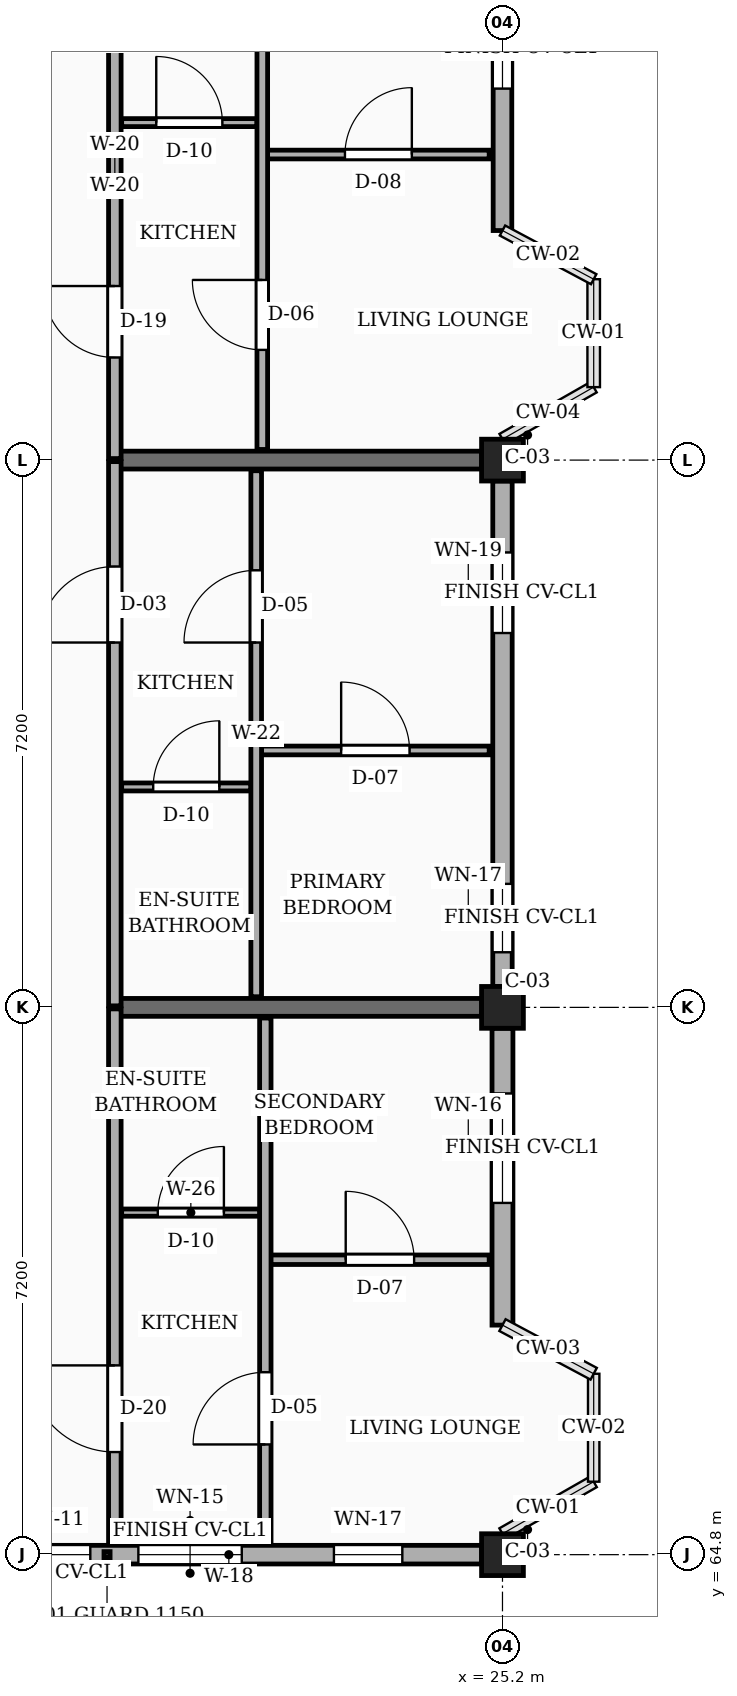
"""IFC4 building model, lengths in metres.
Left out: names, types, materials, properties, quantities, classifications, styles, units other than length and angle.
Written with IfcOpenShell. Run it as: python <this file> out.ifc"""

import sys

from ifc_helpers import new_model, si_unit, direction, frame, frame_2d, origin, origin_2d, place, context, subcontext, project, spatial, rectangle, extrude, element, fill, save


model = new_model("IFC4")
c1 = context("Model", 3, precision=1e-05, world=origin(), true_north=direction((0.0, 1.0)))
c2 = subcontext(c1, "Body", "Model", "MODEL_VIEW")
j1 = project(units=[si_unit("LENGTHUNIT", "METRE"), si_unit("PLANEANGLEUNIT", "RADIAN")], contexts=[c1])
p1 = place(None, origin())
s1 = spatial("IfcSite", under=j1, at=p1, CompositionType="ELEMENT")
p2 = place(p1, origin())
s2 = spatial("IfcBuilding", under=s1, at=p2, CompositionType="ELEMENT")
p3 = place(p2, frame((0.0, 0.0, 13.95)))
s3 = spatial("IfcBuildingStorey", under=s2, at=p3, CompositionType="ELEMENT", Elevation=13.95)
for number, where, z_axis, x_axis in (
    (1, (25.2, 64.8, 0.0), (0.0, 0.0, 1.0), (1.0, 0.0, 0.0)),
    (2, (25.2, 72.0, 0.0), (0.0, 0.0, 1.0), (1.0, 0.0, 0.0)),
    (3, (25.2, 79.2, 0.0), (0.0, 0.0, 1.0), (1.0, 0.0, 0.0)),
):
    element("IfcColumn", number, at=place(p3, frame(where, z_axis=z_axis, x_axis=x_axis)), inside=s3, PredefinedType="COLUMN", context=c2, shape_type="SweptSolid", body=[
        extrude(rectangle(XDim=0.55, YDim=0.55, at=origin_2d()), origin(), (0.0, 0.0, 1.0), 3.15),
    ])
for number, where, z_axis, x_axis in (
    (4, (20.1, 72.0, 0.0), (0.0, 0.0, 1.0), (1.0, 0.0, 0.0)),
    (5, (20.1, 79.2, 0.0), (0.0, 0.0, 1.0), (1.0, 0.0, 0.0)),
):
    element("IfcWall", number, at=place(p3, frame(where, z_axis=z_axis, x_axis=x_axis)), inside=s3, PredefinedType="SOLIDWALL", context=c2, shape_type="SweptSolid", body=[
        extrude(rectangle(XDim=4.825, YDim=0.235, at=frame_2d((2.413, 0.0))), origin(), (0.0, 0.0, 1.0), 2.21),
    ])
p4 = place(p3, frame((18.275, 64.8, 0.0), z_axis=(0.0, 0.0, 1.0), x_axis=(1.0, 0.0, 0.0)))
e6 = element("IfcWall", 6, at=p4, inside=s3, PredefinedType="SOLIDWALL", context=c2, shape_type="SweptSolid", body=[
    extrude(rectangle(XDim=6.65, YDim=0.245, at=frame_2d((3.325, 0.0))), origin(), (0.0, 0.0, 1.0), 2.48),
])
p5 = place(p4, frame((0.462, 0.0, 0.78)))
e7 = element("IfcOpeningElement", 7, at=p5, cuts=e6, PredefinedType="OPENING", context=c2, shape_type="SweptSolid", body=[
    extrude(rectangle(XDim=1.04, YDim=1.26, at=frame_2d((0.52, 0.63))), frame((0.0, 0.133, 0.0), z_axis=(0.0, -1.0, 0.0), x_axis=(1.0, 0.0, 0.0)), (0.0, 0.0, 1.0), 0.265),
])
p6 = place(p4, frame((2.135, 0.0, 0.78)))
e8 = element("IfcOpeningElement", 8, at=p6, cuts=e6, PredefinedType="OPENING", context=c2, shape_type="SweptSolid", body=[
    extrude(rectangle(XDim=1.36, YDim=1.26, at=frame_2d((0.68, 0.63))), frame((0.0, 0.133, 0.0), z_axis=(0.0, -1.0, 0.0), x_axis=(1.0, 0.0, 0.0)), (0.0, 0.0, 1.0), 0.265),
])
p7 = place(p4, frame((4.708, 0.0, 0.78)))
e9 = element("IfcOpeningElement", 9, at=p7, cuts=e6, PredefinedType="OPENING", context=c2, shape_type="SweptSolid", body=[
    extrude(rectangle(XDim=0.9, YDim=1.36, at=frame_2d((0.45, 0.68))), frame((0.0, 0.133, 0.0), z_axis=(0.0, -1.0, 0.0), x_axis=(1.0, 0.0, 0.0)), (0.0, 0.0, 1.0), 0.265),
])
p8 = place(p3, frame((25.2, 67.82, 0.0), z_axis=(0.0, 0.0, 1.0), x_axis=(0.0, 1.0, 0.0)))
e10 = element("IfcWall", 10, at=p8, inside=s3, PredefinedType="SOLIDWALL", context=c2, shape_type="SweptSolid", body=[
    extrude(rectangle(XDim=3.905, YDim=0.275, at=frame_2d((1.953, 0.0))), origin(), (0.0, 0.0, 1.0), 2.48),
])
p9 = place(p8, frame((1.607, 0.0, 0.78)))
e11 = element("IfcOpeningElement", 11, at=p9, cuts=e10, PredefinedType="OPENING", context=c2, shape_type="SweptSolid", body=[
    extrude(rectangle(XDim=1.44, YDim=1.26, at=frame_2d((0.72, 0.63))), frame((0.0, 0.147, 0.0), z_axis=(0.0, -1.0, 0.0), x_axis=(1.0, 0.0, 0.0)), (0.0, 0.0, 1.0), 0.295),
])
p10 = place(p3, frame((25.2, 72.275, 0.0), z_axis=(0.0, 0.0, 1.0), x_axis=(0.0, 1.0, 0.0)))
e12 = element("IfcWall", 12, at=p10, inside=s3, PredefinedType="SOLIDWALL", context=c2, shape_type="SweptSolid", body=[
    extrude(rectangle(XDim=6.65, YDim=0.255, at=frame_2d((3.325, 0.0))), origin(), (0.0, 0.0, 1.0), 2.48),
])
p11 = place(p10, frame((0.45, 0.0, 0.78)))
e13 = element("IfcOpeningElement", 13, at=p11, cuts=e12, PredefinedType="OPENING", context=c2, shape_type="SweptSolid", body=[
    extrude(rectangle(XDim=0.9, YDim=1.36, at=frame_2d((0.45, 0.68))), frame((0.0, 0.137, 0.0), z_axis=(0.0, -1.0, 0.0), x_axis=(1.0, 0.0, 0.0)), (0.0, 0.0, 1.0), 0.275),
])
p12 = place(p10, frame((4.65, 0.0, 0.78)))
e14 = element("IfcOpeningElement", 14, at=p12, cuts=e12, PredefinedType="OPENING", context=c2, shape_type="SweptSolid", body=[
    extrude(rectangle(XDim=1.06, YDim=1.36, at=frame_2d((0.53, 0.68))), frame((0.0, 0.137, 0.0), z_axis=(0.0, -1.0, 0.0), x_axis=(1.0, 0.0, 0.0)), (0.0, 0.0, 1.0), 0.275),
])
p13 = place(p3, frame((25.2, 82.22, 0.0), z_axis=(0.0, 0.0, 1.0), x_axis=(0.0, 1.0, 0.0)))
e15 = element("IfcWall", 15, at=p13, inside=s3, PredefinedType="SOLIDWALL", context=c2, shape_type="SweptSolid", body=[
    extrude(rectangle(XDim=3.905, YDim=0.245, at=frame_2d((1.953, 0.0))), origin(), (0.0, 0.0, 1.0), 2.48),
])
p14 = place(p13, frame((1.867, 0.0, 0.78)))
e16 = element("IfcOpeningElement", 16, at=p14, cuts=e15, PredefinedType="OPENING", context=c2, shape_type="SweptSolid", body=[
    extrude(rectangle(XDim=1.06, YDim=1.36, at=frame_2d((0.53, 0.68))), frame((0.0, 0.133, 0.0), z_axis=(0.0, -1.0, 0.0), x_axis=(1.0, 0.0, 0.0)), (0.0, 0.0, 1.0), 0.265),
])
p15 = place(p3, frame((20.1, 64.975, 0.0), z_axis=(0.0, 0.0, 1.0), x_axis=(0.0, 1.0, 0.0)))
e17 = element("IfcWall", 17, at=p15, inside=s3, PredefinedType="PARTITIONING", context=c2, shape_type="SweptSolid", body=[
    extrude(rectangle(XDim=7.005, YDim=0.165, at=frame_2d((3.502, 0.0))), origin(), (0.0, 0.0, 1.0), 2.345),
])
p16 = place(p15, frame((1.175, 0.0, 0.0)))
e18 = element("IfcOpeningElement", 18, at=p16, cuts=e17, PredefinedType="OPENING", context=c2, shape_type="SweptSolid", body=[
    extrude(rectangle(XDim=1.14, YDim=2.18, at=frame_2d((0.57, 1.09))), frame((0.0, 0.093, 0.0), z_axis=(0.0, -1.0, 0.0), x_axis=(1.0, 0.0, 0.0)), (0.0, 0.0, 1.0), 0.185),
])
p17 = place(p3, frame((20.1, 72.02, 0.0), z_axis=(0.0, 0.0, 1.0), x_axis=(0.0, 1.0, 0.0)))
e19 = element("IfcWall", 19, at=p17, inside=s3, PredefinedType="PARTITIONING", context=c2, shape_type="SweptSolid", body=[
    extrude(rectangle(XDim=7.16, YDim=0.165, at=frame_2d((3.58, 0.0))), origin(), (0.0, 0.0, 1.0), 2.345),
])
p18 = place(p17, frame((4.78, 0.0, 0.0)))
e20 = element("IfcOpeningElement", 20, at=p18, cuts=e19, PredefinedType="OPENING", context=c2, shape_type="SweptSolid", body=[
    extrude(rectangle(XDim=1.0, YDim=2.15, at=frame_2d((0.5, 1.075))), frame((0.0, 0.093, 0.0), z_axis=(0.0, -1.0, 0.0), x_axis=(1.0, 0.0, 0.0)), (0.0, 0.0, 1.0), 0.185),
])
p19 = place(p3, frame((20.1, 79.22, 0.0), z_axis=(0.0, 0.0, 1.0), x_axis=(0.0, 1.0, 0.0)))
e21 = element("IfcWall", 21, at=p19, inside=s3, PredefinedType="PARTITIONING", context=c2, shape_type="SweptSolid", body=[
    extrude(rectangle(XDim=7.16, YDim=0.165, at=frame_2d((3.58, 0.0))), origin(), (0.0, 0.0, 1.0), 2.345),
])
p20 = place(p19, frame((1.33, 0.0, 0.0)))
e22 = element("IfcOpeningElement", 22, at=p20, cuts=e21, PredefinedType="OPENING", context=c2, shape_type="SweptSolid", body=[
    extrude(rectangle(XDim=0.94, YDim=2.12, at=frame_2d((0.47, 1.06))), frame((0.0, 0.093, 0.0), z_axis=(0.0, -1.0, 0.0), x_axis=(1.0, 0.0, 0.0)), (0.0, 0.0, 1.0), 0.185),
])
p21 = place(p3, frame((22.15, 68.68, 0.0), z_axis=(0.0, 0.0, 1.0), x_axis=(1.0, 0.0, 0.0)))
e23 = element("IfcWall", 23, at=p21, inside=s3, PredefinedType="PARTITIONING", context=c2, shape_type="SweptSolid", body=[
    extrude(rectangle(XDim=2.875, YDim=0.125, at=frame_2d((1.438, 0.0))), origin(), (0.0, 0.0, 1.0), 2.345),
])
p22 = place(p21, frame((0.988, 0.0, 0.0)))
e24 = element("IfcOpeningElement", 24, at=p22, cuts=e23, PredefinedType="OPENING", context=c2, shape_type="SweptSolid", body=[
    extrude(rectangle(XDim=0.9, YDim=2.1, at=frame_2d((0.45, 1.05))), frame((0.0, 0.073, 0.0), z_axis=(0.0, -1.0, 0.0), x_axis=(1.0, 0.0, 0.0)), (0.0, 0.0, 1.0), 0.145),
])
p23 = place(p3, frame((20.19, 69.3, 0.0), z_axis=(0.0, 0.0, 1.0), x_axis=(1.0, 0.0, 0.0)))
e25 = element("IfcWall", 25, at=p23, inside=s3, PredefinedType="PARTITIONING", context=c2, shape_type="SweptSolid", body=[
    extrude(rectangle(XDim=1.82, YDim=0.095, at=frame_2d((0.91, 0.0))), origin(), (0.0, 0.0, 1.0), 2.345),
])
p24 = place(p23, frame((0.475, 0.0, 0.0)))
e26 = element("IfcOpeningElement", 26, at=p24, cuts=e25, PredefinedType="OPENING", context=c2, shape_type="SweptSolid", body=[
    extrude(rectangle(XDim=0.87, YDim=2.05, at=frame_2d((0.435, 1.025))), frame((0.0, 0.058, 0.0), z_axis=(0.0, -1.0, 0.0), x_axis=(1.0, 0.0, 0.0)), (0.0, 0.0, 1.0), 0.115),
])
p25 = place(p3, frame((22.08, 64.975, 0.0), z_axis=(0.0, 0.0, 1.0), x_axis=(0.0, 1.0, 0.0)))
e27 = element("IfcWall", 27, at=p25, inside=s3, PredefinedType="PARTITIONING", context=c2, shape_type="SweptSolid", body=[
    extrude(rectangle(XDim=6.885, YDim=0.15, at=frame_2d((3.442, 0.0))), origin(), (0.0, 0.0, 1.0), 2.345),
])
p26 = place(p25, frame((1.275, 0.0, 0.0)))
e28 = element("IfcOpeningElement", 28, at=p26, cuts=e27, PredefinedType="OPENING", context=c2, shape_type="SweptSolid", body=[
    extrude(rectangle(XDim=0.95, YDim=2.1, at=frame_2d((0.475, 1.05))), frame((0.0, 0.085, 0.0), z_axis=(0.0, -1.0, 0.0), x_axis=(1.0, 0.0, 0.0)), (0.0, 0.0, 1.0), 0.17),
])
p27 = place(p3, frame((22.03, 75.38, 0.0), z_axis=(0.0, 0.0, 1.0), x_axis=(1.0, 0.0, 0.0)))
e29 = element("IfcWall", 29, at=p27, inside=s3, PredefinedType="PARTITIONING", context=c2, shape_type="SweptSolid", body=[
    extrude(rectangle(XDim=2.995, YDim=0.115, at=frame_2d((1.498, 0.0))), origin(), (0.0, 0.0, 1.0), 2.345),
])
p28 = place(p27, frame((1.048, 0.0, 0.0)))
e30 = element("IfcOpeningElement", 30, at=p28, cuts=e29, PredefinedType="OPENING", context=c2, shape_type="SweptSolid", body=[
    extrude(rectangle(XDim=0.9, YDim=2.1, at=frame_2d((0.45, 1.05))), frame((0.0, 0.067, 0.0), z_axis=(0.0, -1.0, 0.0), x_axis=(1.0, 0.0, 0.0)), (0.0, 0.0, 1.0), 0.135),
])
p29 = place(p3, frame((20.19, 74.9, 0.0), z_axis=(0.0, 0.0, 1.0), x_axis=(1.0, 0.0, 0.0)))
e31 = element("IfcWall", 31, at=p29, inside=s3, PredefinedType="PARTITIONING", context=c2, shape_type="SweptSolid", body=[
    extrude(rectangle(XDim=1.7, YDim=0.105, at=frame_2d((0.85, 0.0))), origin(), (0.0, 0.0, 1.0), 2.345),
])
p30 = place(p29, frame((0.415, 0.0, 0.0)))
e32 = element("IfcOpeningElement", 32, at=p30, cuts=e31, PredefinedType="OPENING", context=c2, shape_type="SweptSolid", body=[
    extrude(rectangle(XDim=0.87, YDim=2.05, at=frame_2d((0.435, 1.025))), frame((0.0, 0.062, 0.0), z_axis=(0.0, -1.0, 0.0), x_axis=(1.0, 0.0, 0.0)), (0.0, 0.0, 1.0), 0.125),
])
p31 = place(p3, frame((21.96, 72.14, 0.0), z_axis=(0.0, 0.0, 1.0), x_axis=(0.0, 1.0, 0.0)))
e33 = element("IfcWall", 33, at=p31, inside=s3, PredefinedType="PARTITIONING", context=c2, shape_type="SweptSolid", body=[
    extrude(rectangle(XDim=6.92, YDim=0.14, at=frame_2d((3.46, 0.0))), origin(), (0.0, 0.0, 1.0), 2.345),
])
p32 = place(p31, frame((4.66, 0.0, 0.0)))
e34 = element("IfcOpeningElement", 34, at=p32, cuts=e33, PredefinedType="OPENING", context=c2, shape_type="SweptSolid", body=[
    extrude(rectangle(XDim=0.95, YDim=2.1, at=frame_2d((0.475, 1.05))), frame((0.0, 0.08, 0.0), z_axis=(0.0, -1.0, 0.0), x_axis=(1.0, 0.0, 0.0)), (0.0, 0.0, 1.0), 0.16),
])
p33 = place(p3, frame((22.11, 83.22, 0.0), z_axis=(0.0, 0.0, 1.0), x_axis=(1.0, 0.0, 0.0)))
e35 = element("IfcWall", 35, at=p33, inside=s3, PredefinedType="PARTITIONING", context=c2, shape_type="SweptSolid", body=[
    extrude(rectangle(XDim=2.915, YDim=0.115, at=frame_2d((1.458, 0.0))), origin(), (0.0, 0.0, 1.0), 2.345),
])
p34 = place(p33, frame((1.018, 0.0, 0.0)))
e36 = element("IfcOpeningElement", 36, at=p34, cuts=e35, PredefinedType="OPENING", context=c2, shape_type="SweptSolid", body=[
    extrude(rectangle(XDim=0.88, YDim=2.08, at=frame_2d((0.44, 1.04))), frame((0.0, 0.067, 0.0), z_axis=(0.0, -1.0, 0.0), x_axis=(1.0, 0.0, 0.0)), (0.0, 0.0, 1.0), 0.135),
])
p35 = place(p3, frame((20.19, 83.64, 0.0), z_axis=(0.0, 0.0, 1.0), x_axis=(1.0, 0.0, 0.0)))
e37 = element("IfcWall", 37, at=p35, inside=s3, PredefinedType="PARTITIONING", context=c2, shape_type="SweptSolid", body=[
    extrude(rectangle(XDim=1.78, YDim=0.105, at=frame_2d((0.89, 0.0))), origin(), (0.0, 0.0, 1.0), 2.345),
])
p36 = place(p35, frame((0.455, 0.0, 0.0)))
e38 = element("IfcOpeningElement", 38, at=p36, cuts=e37, PredefinedType="OPENING", context=c2, shape_type="SweptSolid", body=[
    extrude(rectangle(XDim=0.87, YDim=2.05, at=frame_2d((0.435, 1.025))), frame((0.0, 0.062, 0.0), z_axis=(0.0, -1.0, 0.0), x_axis=(1.0, 0.0, 0.0)), (0.0, 0.0, 1.0), 0.125),
])
p37 = place(p3, frame((22.04, 79.34, 0.0), z_axis=(0.0, 0.0, 1.0), x_axis=(0.0, 1.0, 0.0)))
e39 = element("IfcWall", 39, at=p37, inside=s3, PredefinedType="PARTITIONING", context=c2, shape_type="SweptSolid", body=[
    extrude(rectangle(XDim=6.92, YDim=0.14, at=frame_2d((3.46, 0.0))), origin(), (0.0, 0.0, 1.0), 2.345),
])
p38 = place(p37, frame((1.31, 0.0, 0.0)))
e40 = element("IfcOpeningElement", 40, at=p38, cuts=e39, PredefinedType="OPENING", context=c2, shape_type="SweptSolid", body=[
    extrude(rectangle(XDim=0.92, YDim=2.1, at=frame_2d((0.46, 1.05))), frame((0.0, 0.08, 0.0), z_axis=(0.0, -1.0, 0.0), x_axis=(1.0, 0.0, 0.0)), (0.0, 0.0, 1.0), 0.16),
])
p39 = place(p5, origin())
e41 = element("IfcWindow", 41, at=p39, inside=s3, PartitioningType="SINGLE_PANEL", PredefinedType="WINDOW", context=c2, shape_type="SweptSolid", body=[
    extrude(rectangle(XDim=1.04, YDim=1.26, at=frame_2d((0.52, 0.63))), frame((0.0, 0.03, 0.0), z_axis=(0.0, -1.0, 0.0), x_axis=(1.0, 0.0, 0.0)), (0.0, 0.0, 1.0), 0.06),
])
fill(e7, e41)
p40 = place(p6, origin())
e42 = element("IfcWindow", 42, at=p40, inside=s3, PartitioningType="SINGLE_PANEL", PredefinedType="WINDOW", context=c2, shape_type="SweptSolid", body=[
    extrude(rectangle(XDim=1.36, YDim=1.26, at=frame_2d((0.68, 0.63))), frame((0.0, 0.03, 0.0), z_axis=(0.0, -1.0, 0.0), x_axis=(1.0, 0.0, 0.0)), (0.0, 0.0, 1.0), 0.06),
])
fill(e8, e42)
p41 = place(p7, origin())
e43 = element("IfcWindow", 43, at=p41, inside=s3, PartitioningType="SINGLE_PANEL", PredefinedType="WINDOW", context=c2, shape_type="SweptSolid", body=[
    extrude(rectangle(XDim=0.9, YDim=1.36, at=frame_2d((0.45, 0.68))), frame((0.0, 0.03, 0.0), z_axis=(0.0, -1.0, 0.0), x_axis=(1.0, 0.0, 0.0)), (0.0, 0.0, 1.0), 0.06),
])
fill(e9, e43)
p42 = place(p9, origin())
e44 = element("IfcWindow", 44, at=p42, inside=s3, PartitioningType="SINGLE_PANEL", PredefinedType="WINDOW", context=c2, shape_type="SweptSolid", body=[
    extrude(rectangle(XDim=1.44, YDim=1.26, at=frame_2d((0.72, 0.63))), frame((0.0, 0.03, 0.0), z_axis=(0.0, -1.0, 0.0), x_axis=(1.0, 0.0, 0.0)), (0.0, 0.0, 1.0), 0.06),
])
fill(e11, e44)
p43 = place(p11, origin())
e45 = element("IfcWindow", 45, at=p43, inside=s3, PartitioningType="SINGLE_PANEL", PredefinedType="WINDOW", context=c2, shape_type="SweptSolid", body=[
    extrude(rectangle(XDim=0.9, YDim=1.36, at=frame_2d((0.45, 0.68))), frame((0.0, 0.03, 0.0), z_axis=(0.0, -1.0, 0.0), x_axis=(1.0, 0.0, 0.0)), (0.0, 0.0, 1.0), 0.06),
])
fill(e13, e45)
p44 = place(p12, origin())
e46 = element("IfcWindow", 46, at=p44, inside=s3, PartitioningType="SINGLE_PANEL", PredefinedType="WINDOW", context=c2, shape_type="SweptSolid", body=[
    extrude(rectangle(XDim=1.06, YDim=1.36, at=frame_2d((0.53, 0.68))), frame((0.0, 0.03, 0.0), z_axis=(0.0, -1.0, 0.0), x_axis=(1.0, 0.0, 0.0)), (0.0, 0.0, 1.0), 0.06),
])
fill(e14, e46)
p45 = place(p14, origin())
e47 = element("IfcWindow", 47, at=p45, inside=s3, PartitioningType="SINGLE_PANEL", PredefinedType="WINDOW", context=c2, shape_type="SweptSolid", body=[
    extrude(rectangle(XDim=1.06, YDim=1.36, at=frame_2d((0.53, 0.68))), frame((0.0, 0.03, 0.0), z_axis=(0.0, -1.0, 0.0), x_axis=(1.0, 0.0, 0.0)), (0.0, 0.0, 1.0), 0.06),
])
fill(e16, e47)
p46 = place(p16, origin())
e48 = element("IfcDoor", 48, at=p46, inside=s3, OperationType="SINGLE_SWING_RIGHT", PredefinedType="DOOR", context=c2, shape_type="SweptSolid", body=[
    extrude(rectangle(XDim=1.14, YDim=2.18, at=frame_2d((0.57, 1.09))), frame((0.0, 0.025, 0.0), z_axis=(0.0, -1.0, 0.0), x_axis=(1.0, 0.0, 0.0)), (0.0, 0.0, 1.0), 0.05),
])
fill(e18, e48)
p47 = place(p18, origin())
e49 = element("IfcDoor", 49, at=p47, inside=s3, OperationType="SINGLE_SWING_LEFT", PredefinedType="DOOR", context=c2, shape_type="SweptSolid", body=[
    extrude(rectangle(XDim=1.0, YDim=2.15, at=frame_2d((0.5, 1.075))), frame((0.0, 0.025, 0.0), z_axis=(0.0, -1.0, 0.0), x_axis=(1.0, 0.0, 0.0)), (0.0, 0.0, 1.0), 0.05),
])
fill(e20, e49)
p48 = place(p20, origin())
e50 = element("IfcDoor", 50, at=p48, inside=s3, OperationType="SINGLE_SWING_RIGHT", PredefinedType="DOOR", context=c2, shape_type="SweptSolid", body=[
    extrude(rectangle(XDim=0.94, YDim=2.12, at=frame_2d((0.47, 1.06))), frame((0.0, 0.025, 0.0), z_axis=(0.0, -1.0, 0.0), x_axis=(1.0, 0.0, 0.0)), (0.0, 0.0, 1.0), 0.05),
])
fill(e22, e50)
p49 = place(p22, origin())
e51 = element("IfcDoor", 51, at=p49, inside=s3, OperationType="SINGLE_SWING_LEFT", PredefinedType="DOOR", context=c2, shape_type="SweptSolid", body=[
    extrude(rectangle(XDim=0.9, YDim=2.1, at=frame_2d((0.45, 1.05))), frame((0.0, 0.025, 0.0), z_axis=(0.0, -1.0, 0.0), x_axis=(1.0, 0.0, 0.0)), (0.0, 0.0, 1.0), 0.05),
])
fill(e24, e51)
p50 = place(p24, origin())
e52 = element("IfcDoor", 52, at=p50, inside=s3, OperationType="SINGLE_SWING_RIGHT", PredefinedType="DOOR", context=c2, shape_type="SweptSolid", body=[
    extrude(rectangle(XDim=0.87, YDim=2.05, at=frame_2d((0.435, 1.025))), frame((0.0, 0.025, 0.0), z_axis=(0.0, -1.0, 0.0), x_axis=(1.0, 0.0, 0.0)), (0.0, 0.0, 1.0), 0.05),
])
fill(e26, e52)
p51 = place(p26, origin())
e53 = element("IfcDoor", 53, at=p51, inside=s3, OperationType="SINGLE_SWING_LEFT", PredefinedType="DOOR", context=c2, shape_type="SweptSolid", body=[
    extrude(rectangle(XDim=0.95, YDim=2.1, at=frame_2d((0.475, 1.05))), frame((0.0, 0.025, 0.0), z_axis=(0.0, -1.0, 0.0), x_axis=(1.0, 0.0, 0.0)), (0.0, 0.0, 1.0), 0.05),
])
fill(e28, e53)
p52 = place(p28, origin())
e54 = element("IfcDoor", 54, at=p52, inside=s3, OperationType="SINGLE_SWING_LEFT", PredefinedType="DOOR", context=c2, shape_type="SweptSolid", body=[
    extrude(rectangle(XDim=0.9, YDim=2.1, at=frame_2d((0.45, 1.05))), frame((0.0, 0.025, 0.0), z_axis=(0.0, -1.0, 0.0), x_axis=(1.0, 0.0, 0.0)), (0.0, 0.0, 1.0), 0.05),
])
fill(e30, e54)
p53 = place(p30, origin())
e55 = element("IfcDoor", 55, at=p53, inside=s3, OperationType="SINGLE_SWING_RIGHT", PredefinedType="DOOR", context=c2, shape_type="SweptSolid", body=[
    extrude(rectangle(XDim=0.87, YDim=2.05, at=frame_2d((0.435, 1.025))), frame((0.0, 0.025, 0.0), z_axis=(0.0, -1.0, 0.0), x_axis=(1.0, 0.0, 0.0)), (0.0, 0.0, 1.0), 0.05),
])
fill(e32, e55)
p54 = place(p32, origin())
e56 = element("IfcDoor", 56, at=p54, inside=s3, OperationType="SINGLE_SWING_LEFT", PredefinedType="DOOR", context=c2, shape_type="SweptSolid", body=[
    extrude(rectangle(XDim=0.95, YDim=2.1, at=frame_2d((0.475, 1.05))), frame((0.0, 0.025, 0.0), z_axis=(0.0, -1.0, 0.0), x_axis=(1.0, 0.0, 0.0)), (0.0, 0.0, 1.0), 0.05),
])
fill(e34, e56)
p55 = place(p34, origin())
e57 = element("IfcDoor", 57, at=p55, inside=s3, OperationType="SINGLE_SWING_RIGHT", PredefinedType="DOOR", context=c2, shape_type="SweptSolid", body=[
    extrude(rectangle(XDim=0.88, YDim=2.08, at=frame_2d((0.44, 1.04))), frame((0.0, 0.025, 0.0), z_axis=(0.0, -1.0, 0.0), x_axis=(1.0, 0.0, 0.0)), (0.0, 0.0, 1.0), 0.05),
])
fill(e36, e57)
p56 = place(p36, origin())
e58 = element("IfcDoor", 58, at=p56, inside=s3, OperationType="SINGLE_SWING_LEFT", PredefinedType="DOOR", context=c2, shape_type="SweptSolid", body=[
    extrude(rectangle(XDim=0.87, YDim=2.05, at=frame_2d((0.435, 1.025))), frame((0.0, 0.025, 0.0), z_axis=(0.0, -1.0, 0.0), x_axis=(1.0, 0.0, 0.0)), (0.0, 0.0, 1.0), 0.05),
])
fill(e38, e58)
p57 = place(p38, origin())
e59 = element("IfcDoor", 59, at=p57, inside=s3, OperationType="SINGLE_SWING_RIGHT", PredefinedType="DOOR", context=c2, shape_type="SweptSolid", body=[
    extrude(rectangle(XDim=0.92, YDim=2.1, at=frame_2d((0.46, 1.05))), frame((0.0, 0.025, 0.0), z_axis=(0.0, -1.0, 0.0), x_axis=(1.0, 0.0, 0.0)), (0.0, 0.0, 1.0), 0.05),
])
fill(e40, e59)
save(model, sys.argv[1])
